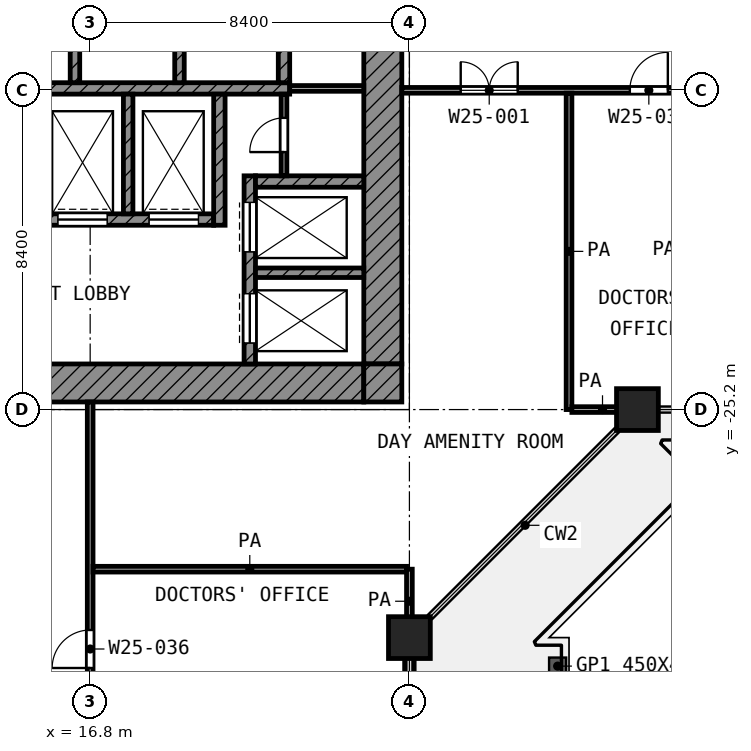
"""IFC4 building model, lengths in metres.
Left out: names, types, materials, properties, quantities, classifications, styles, units other than length and angle.
Written with IfcOpenShell. Run it as: python <this file> out.ifc"""

import sys

from ifc_helpers import new_model, si_unit, direction, frame, frame_2d, origin, origin_2d, place, context, subcontext, project, spatial, rectangle, extrude, element, fill, save


model = new_model("IFC4")
c1 = context("Model", 3, precision=1e-05, world=origin(), true_north=direction((0.0, 1.0)))
c2 = subcontext(c1, "Body", "Model", "MODEL_VIEW")
j1 = project(units=[si_unit("LENGTHUNIT", "METRE"), si_unit("PLANEANGLEUNIT", "RADIAN")], contexts=[c1])
p1 = place(None, origin())
s1 = spatial("IfcSite", under=j1, at=p1, CompositionType="ELEMENT")
p2 = place(p1, origin())
s2 = spatial("IfcBuilding", under=s1, at=p2, CompositionType="ELEMENT")
p3 = place(p2, frame((0.0, 0.0, 111.4)))
s3 = spatial("IfcBuildingStorey", under=s2, at=p3, CompositionType="ELEMENT", Elevation=111.4)
for number, where, z_axis, x_axis in (
    (1, (31.2, -25.2, 0.0), (0.0, 0.0, 1.0), (1.0, 0.0, 0.0)),
    (2, (25.2, -31.2, 0.0), (0.0, 0.0, 1.0), (1.0, 0.0, 0.0)),
):
    element("IfcColumn", number, at=place(p3, frame(where, z_axis=z_axis, x_axis=x_axis)), inside=s3, PredefinedType="COLUMN", context=c2, shape_type="SweptSolid", body=[
        extrude(rectangle(XDim=1.1, YDim=1.1, at=origin_2d()), origin(), (0.0, 0.0, 1.0), 4.2),
    ])
p4 = place(p3, frame((25.2, -34.992, 0.0), z_axis=(0.0, 0.0, 1.0), x_axis=(0.0, 1.0, 0.0)))
e3 = element("IfcWall", 3, at=p4, inside=s3, PredefinedType="SOLIDWALL", context=c2, shape_type="SweptSolid", body=[
    extrude(rectangle(XDim=3.242, YDim=0.25, at=frame_2d((1.621, 0.0))), origin(), (0.0, 0.0, 1.0), 3.48),
])
p5 = place(p4, frame((1.621, 0.0, 0.0)))
e4 = element("IfcOpeningElement", 4, at=p5, cuts=e3, PredefinedType="OPENING", context=c2, shape_type="SweptSolid", body=[
    extrude(rectangle(XDim=1.0, YDim=2.1, at=frame_2d((0.5, 1.05))), frame((0.0, 0.135, 0.0), z_axis=(0.0, -1.0, 0.0), x_axis=(1.0, 0.0, 0.0)), (0.0, 0.0, 1.0), 0.27),
])
p6 = place(p3, frame((24.5, -24.0, 0.0), z_axis=(0.0, 0.0, 1.0), x_axis=(0.0, 1.0, 0.0)))
e5 = element("IfcWall", 5, at=p6, inside=s3, PredefinedType="SHEAR", context=c2, shape_type="SweptSolid", body=[
    extrude(rectangle(XDim=18.6, YDim=1.0, at=frame_2d((9.3, 0.0))), origin(), (0.0, 0.0, 1.0), 3.6),
])
p7 = place(p6, frame((10.5, 0.0, 0.0)))
e6 = element("IfcOpeningElement", 6, at=p7, cuts=e5, PredefinedType="OPENING", context=c2, shape_type="SweptSolid", body=[
    extrude(rectangle(XDim=1.8, YDim=2.1, at=frame_2d((0.9, 1.05))), frame((0.0, 0.51, 0.0), z_axis=(0.0, -1.0, 0.0), x_axis=(1.0, 0.0, 0.0)), (0.0, 0.0, 1.0), 1.02),
])
p8 = place(p3, frame((5.4, -24.5, 0.0), z_axis=(0.0, 0.0, 1.0), x_axis=(1.0, 0.0, 0.0)))
e7 = element("IfcWall", 7, at=p8, inside=s3, PredefinedType="SHEAR", context=c2, shape_type="SweptSolid", body=[
    extrude(rectangle(XDim=18.6, YDim=1.0, at=frame_2d((9.3, 0.0))), origin(), (0.0, 0.0, 1.0), 3.6),
])
p9 = place(p8, frame((6.3, 0.0, 0.0)))
e8 = element("IfcOpeningElement", 8, at=p9, cuts=e7, PredefinedType="OPENING", context=c2, shape_type="SweptSolid", body=[
    extrude(rectangle(XDim=1.8, YDim=2.1, at=frame_2d((0.9, 1.05))), frame((0.0, 0.51, 0.0), z_axis=(0.0, -1.0, 0.0), x_axis=(1.0, 0.0, 0.0)), (0.0, 0.0, 1.0), 1.02),
])
p10 = place(p3, frame((24.5, -25.0, 0.0), z_axis=(0.0, 0.0, 1.0), x_axis=(0.0, 1.0, 0.0)))
e9 = element("IfcWall", 9, at=p10, inside=s3, PredefinedType="SHEAR", context=c2, shape_type="SweptSolid", body=[
    extrude(rectangle(XDim=1.0, YDim=1.0, at=frame_2d((0.5, 0.0))), origin(), (0.0, 0.0, 1.0), 3.6),
])
p11 = place(p3, frame((5.4, -16.75, 0.0), z_axis=(0.0, 0.0, 1.0), x_axis=(1.0, 0.0, 0.0)))
e10 = element("IfcWall", 10, at=p11, inside=s3, PredefinedType="SHEAR", context=c2, shape_type="SweptSolid", body=[
    extrude(rectangle(XDim=16.65, YDim=0.3, at=frame_2d((8.325, 0.0))), origin(), (0.0, 0.0, 1.0), 3.6),
])
p12 = place(p3, frame((5.4, -20.2, 0.0), z_axis=(0.0, 0.0, 1.0), x_axis=(1.0, 0.0, 0.0)))
e11 = element("IfcWall", 11, at=p12, inside=s3, PredefinedType="SHEAR", context=c2, shape_type="SweptSolid", body=[
    extrude(rectangle(XDim=14.65, YDim=0.3, at=frame_2d((7.325, 0.0))), origin(), (0.0, 0.0, 1.0), 3.6),
])
p13 = place(p12, frame((10.55, 0.0, 0.0)))
e12 = element("IfcOpeningElement", 12, at=p13, cuts=e11, PredefinedType="OPENING", context=c2, shape_type="SweptSolid", body=[
    extrude(rectangle(XDim=1.3, YDim=2.1, at=frame_2d((0.65, 1.05))), frame((0.0, 0.16, 0.0), z_axis=(0.0, -1.0, 0.0), x_axis=(1.0, 0.0, 0.0)), (0.0, 0.0, 1.0), 0.32),
])
p14 = place(p12, frame((12.95, 0.0, 0.0)))
e13 = element("IfcOpeningElement", 13, at=p14, cuts=e11, PredefinedType="OPENING", context=c2, shape_type="SweptSolid", body=[
    extrude(rectangle(XDim=1.3, YDim=2.1, at=frame_2d((0.65, 1.05))), frame((0.0, 0.16, 0.0), z_axis=(0.0, -1.0, 0.0), x_axis=(1.0, 0.0, 0.0)), (0.0, 0.0, 1.0), 0.32),
])
p15 = place(p12, frame((0.55, 0.0, 0.0)))
e14 = element("IfcOpeningElement", 14, at=p15, cuts=e11, PredefinedType="OPENING", context=c2, shape_type="SweptSolid", body=[
    extrude(rectangle(XDim=1.3, YDim=2.1, at=frame_2d((0.65, 1.05))), frame((0.0, 0.16, 0.0), z_axis=(0.0, -1.0, 0.0), x_axis=(1.0, 0.0, 0.0)), (0.0, 0.0, 1.0), 0.32),
])
p16 = place(p12, frame((2.95, 0.0, 0.0)))
e15 = element("IfcOpeningElement", 15, at=p16, cuts=e11, PredefinedType="OPENING", context=c2, shape_type="SweptSolid", body=[
    extrude(rectangle(XDim=1.3, YDim=2.1, at=frame_2d((0.65, 1.05))), frame((0.0, 0.16, 0.0), z_axis=(0.0, -1.0, 0.0), x_axis=(1.0, 0.0, 0.0)), (0.0, 0.0, 1.0), 0.32),
])
p17 = place(p12, frame((5.95, 0.0, 0.0)))
e16 = element("IfcOpeningElement", 16, at=p17, cuts=e11, PredefinedType="OPENING", context=c2, shape_type="SweptSolid", body=[
    extrude(rectangle(XDim=0.9, YDim=2.1, at=frame_2d((0.45, 1.05))), frame((0.0, 0.16, 0.0), z_axis=(0.0, -1.0, 0.0), x_axis=(1.0, 0.0, 0.0)), (0.0, 0.0, 1.0), 0.32),
])
p18 = place(p12, frame((8.35, 0.0, 0.0)))
e17 = element("IfcOpeningElement", 17, at=p18, cuts=e11, PredefinedType="OPENING", context=c2, shape_type="SweptSolid", body=[
    extrude(rectangle(XDim=0.9, YDim=2.1, at=frame_2d((0.45, 1.05))), frame((0.0, 0.16, 0.0), z_axis=(0.0, -1.0, 0.0), x_axis=(1.0, 0.0, 0.0)), (0.0, 0.0, 1.0), 0.32),
])
p19 = place(p3, frame((20.2, -20.35, 0.0), z_axis=(0.0, 0.0, 1.0), x_axis=(0.0, 1.0, 0.0)))
e18 = element("IfcWall", 18, at=p19, inside=s3, PredefinedType="SHEAR", context=c2, shape_type="SweptSolid", body=[
    extrude(rectangle(XDim=3.45, YDim=0.3, at=frame_2d((1.725, 0.0))), origin(), (0.0, 0.0, 1.0), 3.6),
])
p20 = place(p3, frame((21.9, -16.6, 0.0), z_axis=(0.0, 0.0, 1.0), x_axis=(0.0, 1.0, 0.0)))
e19 = element("IfcWall", 19, at=p20, inside=s3, PredefinedType="SHEAR", context=c2, shape_type="SweptSolid", body=[
    extrude(rectangle(XDim=2.35, YDim=0.3, at=frame_2d((1.175, 0.0))), origin(), (0.0, 0.0, 1.0), 3.6),
])
p21 = place(p3, frame((21.15, -19.2, 0.0), z_axis=(0.0, 0.0, 1.0), x_axis=(1.0, 0.0, 0.0)))
e20 = element("IfcWall", 20, at=p21, inside=s3, PredefinedType="SHEAR", context=c2, shape_type="SweptSolid", body=[
    extrude(rectangle(XDim=2.85, YDim=0.3, at=frame_2d((1.425, 0.0))), origin(), (0.0, 0.0, 1.0), 3.6),
])
p22 = place(p3, frame((21.0, -24.0, 0.0), z_axis=(0.0, 0.0, 1.0), x_axis=(0.0, 1.0, 0.0)))
e21 = element("IfcWall", 21, at=p22, inside=s3, PredefinedType="SHEAR", context=c2, shape_type="SweptSolid", body=[
    extrude(rectangle(XDim=4.95, YDim=0.3, at=frame_2d((2.475, 0.0))), origin(), (0.0, 0.0, 1.0), 3.6),
])
p23 = place(p22, frame((2.95, 0.0, 0.0)))
e22 = element("IfcOpeningElement", 22, at=p23, cuts=e21, PredefinedType="OPENING", context=c2, shape_type="SweptSolid", body=[
    extrude(rectangle(XDim=1.3, YDim=2.1, at=frame_2d((0.65, 1.05))), frame((0.0, 0.16, 0.0), z_axis=(0.0, -1.0, 0.0), x_axis=(1.0, 0.0, 0.0)), (0.0, 0.0, 1.0), 0.32),
])
p24 = place(p22, frame((0.55, 0.0, 0.0)))
e23 = element("IfcOpeningElement", 23, at=p24, cuts=e21, PredefinedType="OPENING", context=c2, shape_type="SweptSolid", body=[
    extrude(rectangle(XDim=1.3, YDim=2.1, at=frame_2d((0.65, 1.05))), frame((0.0, 0.16, 0.0), z_axis=(0.0, -1.0, 0.0), x_axis=(1.0, 0.0, 0.0)), (0.0, 0.0, 1.0), 0.32),
])
p25 = place(p3, frame((21.15, -21.6, 0.0), z_axis=(0.0, 0.0, 1.0), x_axis=(1.0, 0.0, 0.0)))
e24 = element("IfcWall", 24, at=p25, inside=s3, PredefinedType="SHEAR", context=c2, shape_type="SweptSolid", body=[
    extrude(rectangle(XDim=2.85, YDim=0.25, at=frame_2d((1.425, 0.0))), origin(), (0.0, 0.0, 1.0), 3.6),
])
p26 = place(p3, frame((17.8, -20.05, 0.0), z_axis=(0.0, 0.0, 1.0), x_axis=(0.0, 1.0, 0.0)))
e25 = element("IfcWall", 25, at=p26, inside=s3, PredefinedType="SHEAR", context=c2, shape_type="SweptSolid", body=[
    extrude(rectangle(XDim=3.15, YDim=0.25, at=frame_2d((1.575, 0.0))), origin(), (0.0, 0.0, 1.0), 3.6),
])
for number, where, z_axis, x_axis in (
    (26, (16.4, -16.6, 0.0), (0.0, 0.0, 1.0), (0.0, 1.0, 0.0)),
    (27, (19.15, -16.6, 0.0), (0.0, 0.0, 1.0), (0.0, 1.0, 0.0)),
):
    element("IfcWall", number, at=place(p3, frame(where, z_axis=z_axis, x_axis=x_axis)), inside=s3, PredefinedType="SHEAR", context=c2, shape_type="SweptSolid", body=[
        extrude(rectangle(XDim=2.35, YDim=0.25, at=frame_2d((1.175, 0.0))), origin(), (0.0, 0.0, 1.0), 3.6),
    ])
p27 = place(p3, frame((21.9, -19.05, 0.0), z_axis=(0.0, 0.0, 1.0), x_axis=(0.0, 1.0, 0.0)))
e28 = element("IfcWall", 28, at=p27, inside=s3, PredefinedType="PARTITIONING", context=c2, shape_type="SweptSolid", body=[
    extrude(rectangle(XDim=2.15, YDim=0.15, at=frame_2d((1.075, 0.0))), origin(), (0.0, 0.0, 1.0), 3.6),
])
p28 = place(p27, frame((0.625, 0.0, 0.0)))
e29 = element("IfcOpeningElement", 29, at=p28, cuts=e28, PredefinedType="OPENING", context=c2, shape_type="SweptSolid", body=[
    extrude(rectangle(XDim=0.9, YDim=2.1, at=frame_2d((0.45, 1.05))), frame((0.0, 0.085, 0.0), z_axis=(0.0, -1.0, 0.0), x_axis=(1.0, 0.0, 0.0)), (0.0, 0.0, 1.0), 0.17),
])
p29 = place(p3, frame((22.05, -16.75, 0.0), z_axis=(0.0, 0.0, 1.0), x_axis=(1.0, 0.0, 0.0)))
e30 = element("IfcWall", 30, at=p29, inside=s3, PredefinedType="PARTITIONING", context=c2, shape_type="SweptSolid", body=[
    extrude(rectangle(XDim=1.95, YDim=0.15, at=frame_2d((0.975, 0.0))), origin(), (0.0, 0.0, 1.0), 3.6),
])
p30 = place(p3, frame((16.875, -29.4, 0.0), z_axis=(0.0, 0.0, 1.0), x_axis=(1.0, 0.0, 0.0)))
e31 = element("IfcWall", 31, at=p30, inside=s3, PredefinedType="PARTITIONING", context=c2, shape_type="SweptSolid", body=[
    extrude(rectangle(XDim=8.25, YDim=0.15, at=frame_2d((4.125, 0.0))), origin(), (0.0, 0.0, 1.0), 3.6),
])
p31 = place(p3, frame((29.475, -25.2, 0.0), z_axis=(0.0, 0.0, 1.0), x_axis=(1.0, 0.0, 0.0)))
e32 = element("IfcWall", 32, at=p31, inside=s3, PredefinedType="PARTITIONING", context=c2, shape_type="SweptSolid", body=[
    extrude(rectangle(XDim=1.612, YDim=0.15, at=frame_2d((0.806, 0.0))), origin(), (0.0, 0.0, 1.0), 3.6),
])
p32 = place(p3, frame((25.0, -16.8, 0.0), z_axis=(0.0, 0.0, 1.0), x_axis=(1.0, 0.0, 0.0)))
e33 = element("IfcWall", 33, at=p32, inside=s3, PredefinedType="PARTITIONING", context=c2, shape_type="SweptSolid", body=[
    extrude(rectangle(XDim=50.52, YDim=0.15, at=frame_2d((25.26, 0.0))), origin(), (0.0, 0.0, 1.0), 3.6),
])
p33 = place(p32, frame((1.55, 0.0, 0.0)))
e34 = element("IfcOpeningElement", 34, at=p33, cuts=e33, PredefinedType="OPENING", context=c2, shape_type="SweptSolid", body=[
    extrude(rectangle(XDim=1.5, YDim=2.1, at=frame_2d((0.75, 1.05))), frame((0.0, 0.085, 0.0), z_axis=(0.0, -1.0, 0.0), x_axis=(1.0, 0.0, 0.0)), (0.0, 0.0, 1.0), 0.17),
])
p34 = place(p32, frame((6.0, 0.0, 0.0)))
e35 = element("IfcOpeningElement", 35, at=p34, cuts=e33, PredefinedType="OPENING", context=c2, shape_type="SweptSolid", body=[
    extrude(rectangle(XDim=1.0, YDim=2.1, at=frame_2d((0.5, 1.05))), frame((0.0, 0.085, 0.0), z_axis=(0.0, -1.0, 0.0), x_axis=(1.0, 0.0, 0.0)), (0.0, 0.0, 1.0), 0.17),
])
p35 = place(p32, frame((9.6, 0.0, 0.0)))
e36 = element("IfcOpeningElement", 36, at=p35, cuts=e33, PredefinedType="OPENING", context=c2, shape_type="SweptSolid", body=[
    extrude(rectangle(XDim=1.2, YDim=2.1, at=frame_2d((0.6, 1.05))), frame((0.0, 0.085, 0.0), z_axis=(0.0, -1.0, 0.0), x_axis=(1.0, 0.0, 0.0)), (0.0, 0.0, 1.0), 0.17),
])
p36 = place(p32, frame((18.2, 0.0, 0.0)))
e37 = element("IfcOpeningElement", 37, at=p36, cuts=e33, PredefinedType="OPENING", context=c2, shape_type="SweptSolid", body=[
    extrude(rectangle(XDim=1.2, YDim=2.1, at=frame_2d((0.6, 1.05))), frame((0.0, 0.085, 0.0), z_axis=(0.0, -1.0, 0.0), x_axis=(1.0, 0.0, 0.0)), (0.0, 0.0, 1.0), 0.17),
])
p37 = place(p32, frame((15.45, 0.0, 0.0)))
e38 = element("IfcOpeningElement", 38, at=p37, cuts=e33, PredefinedType="OPENING", context=c2, shape_type="SweptSolid", body=[
    extrude(rectangle(XDim=0.9, YDim=2.1, at=frame_2d((0.45, 1.05))), frame((0.0, 0.085, 0.0), z_axis=(0.0, -1.0, 0.0), x_axis=(1.0, 0.0, 0.0)), (0.0, 0.0, 1.0), 0.17),
])
p38 = place(p32, frame((23.6, 0.0, 0.0)))
e39 = element("IfcOpeningElement", 39, at=p38, cuts=e33, PredefinedType="OPENING", context=c2, shape_type="SweptSolid", body=[
    extrude(rectangle(XDim=1.2, YDim=2.1, at=frame_2d((0.6, 1.05))), frame((0.0, 0.085, 0.0), z_axis=(0.0, -1.0, 0.0), x_axis=(1.0, 0.0, 0.0)), (0.0, 0.0, 1.0), 0.17),
])
p39 = place(p32, frame((26.1, 0.0, 0.0)))
e40 = element("IfcOpeningElement", 40, at=p39, cuts=e33, PredefinedType="OPENING", context=c2, shape_type="SweptSolid", body=[
    extrude(rectangle(XDim=1.2, YDim=2.1, at=frame_2d((0.6, 1.05))), frame((0.0, 0.085, 0.0), z_axis=(0.0, -1.0, 0.0), x_axis=(1.0, 0.0, 0.0)), (0.0, 0.0, 1.0), 0.17),
])
p40 = place(p32, frame((32.0, 0.0, 0.0)))
e41 = element("IfcOpeningElement", 41, at=p40, cuts=e33, PredefinedType="OPENING", context=c2, shape_type="SweptSolid", body=[
    extrude(rectangle(XDim=1.2, YDim=2.1, at=frame_2d((0.6, 1.05))), frame((0.0, 0.085, 0.0), z_axis=(0.0, -1.0, 0.0), x_axis=(1.0, 0.0, 0.0)), (0.0, 0.0, 1.0), 0.17),
])
p41 = place(p32, frame((35.0, 0.0, 0.0)))
e42 = element("IfcOpeningElement", 42, at=p41, cuts=e33, PredefinedType="OPENING", context=c2, shape_type="SweptSolid", body=[
    extrude(rectangle(XDim=1.2, YDim=2.1, at=frame_2d((0.6, 1.05))), frame((0.0, 0.085, 0.0), z_axis=(0.0, -1.0, 0.0), x_axis=(1.0, 0.0, 0.0)), (0.0, 0.0, 1.0), 0.17),
])
p42 = place(p32, frame((40.4, 0.0, 0.0)))
e43 = element("IfcOpeningElement", 43, at=p42, cuts=e33, PredefinedType="OPENING", context=c2, shape_type="SweptSolid", body=[
    extrude(rectangle(XDim=1.2, YDim=2.1, at=frame_2d((0.6, 1.05))), frame((0.0, 0.085, 0.0), z_axis=(0.0, -1.0, 0.0), x_axis=(1.0, 0.0, 0.0)), (0.0, 0.0, 1.0), 0.17),
])
p43 = place(p32, frame((38.8, 0.0, 0.0)))
e44 = element("IfcOpeningElement", 44, at=p43, cuts=e33, PredefinedType="OPENING", context=c2, shape_type="SweptSolid", body=[
    extrude(rectangle(XDim=1.2, YDim=2.1, at=frame_2d((0.6, 1.05))), frame((0.0, 0.085, 0.0), z_axis=(0.0, -1.0, 0.0), x_axis=(1.0, 0.0, 0.0)), (0.0, 0.0, 1.0), 0.17),
])
p44 = place(p32, frame((47.85, 0.0, 0.0)))
e45 = element("IfcOpeningElement", 45, at=p44, cuts=e33, PredefinedType="OPENING", context=c2, shape_type="SweptSolid", body=[
    extrude(rectangle(XDim=1.0, YDim=2.1, at=frame_2d((0.5, 1.05))), frame((0.0, 0.085, 0.0), z_axis=(0.0, -1.0, 0.0), x_axis=(1.0, 0.0, 0.0)), (0.0, 0.0, 1.0), 0.17),
])
p45 = place(p3, frame((16.8, -58.72, 0.0), z_axis=(0.0, 0.0, 1.0), x_axis=(0.0, 1.0, 0.0)))
e46 = element("IfcWall", 46, at=p45, inside=s3, PredefinedType="PARTITIONING", context=c2, shape_type="SweptSolid", body=[
    extrude(rectangle(XDim=33.72, YDim=0.15, at=frame_2d((16.86, 0.0))), origin(), (0.0, 0.0, 1.0), 2.7),
])
p46 = place(p45, frame((26.72, 0.0, 0.0)))
e47 = element("IfcOpeningElement", 47, at=p46, cuts=e46, PredefinedType="OPENING", context=c2, shape_type="SweptSolid", body=[
    extrude(rectangle(XDim=1.0, YDim=2.1, at=frame_2d((0.5, 1.05))), frame((0.0, 0.085, 0.0), z_axis=(0.0, -1.0, 0.0), x_axis=(1.0, 0.0, 0.0)), (0.0, 0.0, 1.0), 0.17),
])
p47 = place(p45, frame((23.32, 0.0, 0.0)))
e48 = element("IfcOpeningElement", 48, at=p47, cuts=e46, PredefinedType="OPENING", context=c2, shape_type="SweptSolid", body=[
    extrude(rectangle(XDim=1.2, YDim=2.1, at=frame_2d((0.6, 1.05))), frame((0.0, 0.085, 0.0), z_axis=(0.0, -1.0, 0.0), x_axis=(1.0, 0.0, 0.0)), (0.0, 0.0, 1.0), 0.17),
])
p48 = place(p45, frame((14.92, 0.0, 0.0)))
e49 = element("IfcOpeningElement", 49, at=p48, cuts=e46, PredefinedType="OPENING", context=c2, shape_type="SweptSolid", body=[
    extrude(rectangle(XDim=1.2, YDim=2.1, at=frame_2d((0.6, 1.05))), frame((0.0, 0.085, 0.0), z_axis=(0.0, -1.0, 0.0), x_axis=(1.0, 0.0, 0.0)), (0.0, 0.0, 1.0), 0.17),
])
p49 = place(p45, frame((13.32, 0.0, 0.0)))
e50 = element("IfcOpeningElement", 50, at=p49, cuts=e46, PredefinedType="OPENING", context=c2, shape_type="SweptSolid", body=[
    extrude(rectangle(XDim=1.2, YDim=2.1, at=frame_2d((0.6, 1.05))), frame((0.0, 0.085, 0.0), z_axis=(0.0, -1.0, 0.0), x_axis=(1.0, 0.0, 0.0)), (0.0, 0.0, 1.0), 0.17),
])
p50 = place(p45, frame((9.52, 0.0, 0.0)))
e51 = element("IfcOpeningElement", 51, at=p50, cuts=e46, PredefinedType="OPENING", context=c2, shape_type="SweptSolid", body=[
    extrude(rectangle(XDim=1.2, YDim=2.1, at=frame_2d((0.6, 1.05))), frame((0.0, 0.085, 0.0), z_axis=(0.0, -1.0, 0.0), x_axis=(1.0, 0.0, 0.0)), (0.0, 0.0, 1.0), 0.17),
])
p51 = place(p45, frame((3.37, 0.0, 0.0)))
e52 = element("IfcOpeningElement", 52, at=p51, cuts=e46, PredefinedType="OPENING", context=c2, shape_type="SweptSolid", body=[
    extrude(rectangle(XDim=1.5, YDim=2.1, at=frame_2d((0.75, 1.05))), frame((0.0, 0.085, 0.0), z_axis=(0.0, -1.0, 0.0), x_axis=(1.0, 0.0, 0.0)), (0.0, 0.0, 1.0), 0.17),
])
p52 = place(p3, frame((25.2, -31.087, 0.0), z_axis=(0.0, 0.0, 1.0), x_axis=(0.0, 1.0, 0.0)))
e53 = element("IfcWall", 53, at=p52, inside=s3, PredefinedType="PARTITIONING", context=c2, shape_type="SweptSolid", body=[
    extrude(rectangle(XDim=1.687, YDim=0.15, at=frame_2d((0.844, 0.0))), origin(), (0.0, 0.0, 1.0), 3.6),
])
p53 = place(p3, frame((29.4, -25.2, 0.0), z_axis=(0.0, 0.0, 1.0), x_axis=(0.0, 1.0, 0.0)))
e54 = element("IfcWall", 54, at=p53, inside=s3, PredefinedType="PARTITIONING", context=c2, shape_type="SweptSolid", body=[
    extrude(rectangle(XDim=8.325, YDim=0.15, at=frame_2d((4.163, 0.0))), origin(), (0.0, 0.0, 1.0), 3.6),
])
p54 = place(p23, origin())
e55 = element("IfcDoor", 55, at=p54, inside=s3, OperationType="DOUBLE_DOOR_SLIDING", PredefinedType="DOOR", context=c2, shape_type="SweptSolid", body=[
    extrude(rectangle(XDim=1.3, YDim=2.1, at=frame_2d((0.65, 1.05))), frame((0.0, 0.025, 0.0), z_axis=(0.0, -1.0, 0.0), x_axis=(1.0, 0.0, 0.0)), (0.0, 0.0, 1.0), 0.05),
])
fill(e22, e55)
p55 = place(p24, origin())
e56 = element("IfcDoor", 56, at=p55, inside=s3, OperationType="DOUBLE_DOOR_SLIDING", PredefinedType="DOOR", context=c2, shape_type="SweptSolid", body=[
    extrude(rectangle(XDim=1.3, YDim=2.1, at=frame_2d((0.65, 1.05))), frame((0.0, 0.025, 0.0), z_axis=(0.0, -1.0, 0.0), x_axis=(1.0, 0.0, 0.0)), (0.0, 0.0, 1.0), 0.05),
])
fill(e23, e56)
p56 = place(p13, origin())
e57 = element("IfcDoor", 57, at=p56, inside=s3, OperationType="DOUBLE_DOOR_SLIDING", PredefinedType="DOOR", context=c2, shape_type="SweptSolid", body=[
    extrude(rectangle(XDim=1.3, YDim=2.1, at=frame_2d((0.65, 1.05))), frame((0.0, 0.025, 0.0), z_axis=(0.0, -1.0, 0.0), x_axis=(1.0, 0.0, 0.0)), (0.0, 0.0, 1.0), 0.05),
])
fill(e12, e57)
p57 = place(p14, origin())
e58 = element("IfcDoor", 58, at=p57, inside=s3, OperationType="DOUBLE_DOOR_SLIDING", PredefinedType="DOOR", context=c2, shape_type="SweptSolid", body=[
    extrude(rectangle(XDim=1.3, YDim=2.1, at=frame_2d((0.65, 1.05))), frame((0.0, 0.025, 0.0), z_axis=(0.0, -1.0, 0.0), x_axis=(1.0, 0.0, 0.0)), (0.0, 0.0, 1.0), 0.05),
])
fill(e13, e58)
p58 = place(p28, origin())
e59 = element("IfcDoor", 59, at=p58, inside=s3, OperationType="SINGLE_SWING_LEFT", PredefinedType="DOOR", context=c2, shape_type="SweptSolid", body=[
    extrude(rectangle(XDim=0.9, YDim=2.1, at=frame_2d((0.45, 1.05))), frame((0.0, 0.025, 0.0), z_axis=(0.0, -1.0, 0.0), x_axis=(1.0, 0.0, 0.0)), (0.0, 0.0, 1.0), 0.05),
])
fill(e29, e59)
p59 = place(p33, origin())
e60 = element("IfcDoor", 60, at=p59, inside=s3, OperationType="DOUBLE_DOOR_SINGLE_SWING", PredefinedType="DOOR", context=c2, shape_type="SweptSolid", body=[
    extrude(rectangle(XDim=1.5, YDim=2.1, at=frame_2d((0.75, 1.05))), frame((0.0, 0.025, 0.0), z_axis=(0.0, -1.0, 0.0), x_axis=(1.0, 0.0, 0.0)), (0.0, 0.0, 1.0), 0.05),
])
fill(e34, e60)
p60 = place(p34, origin())
e61 = element("IfcDoor", 61, at=p60, inside=s3, OperationType="SINGLE_SWING_RIGHT", PredefinedType="DOOR", context=c2, shape_type="SweptSolid", body=[
    extrude(rectangle(XDim=1.0, YDim=2.1, at=frame_2d((0.5, 1.05))), frame((0.0, 0.025, 0.0), z_axis=(0.0, -1.0, 0.0), x_axis=(1.0, 0.0, 0.0)), (0.0, 0.0, 1.0), 0.05),
])
fill(e35, e61)
p61 = place(p46, origin())
e62 = element("IfcDoor", 62, at=p61, inside=s3, OperationType="SINGLE_SWING_LEFT", PredefinedType="DOOR", context=c2, shape_type="SweptSolid", body=[
    extrude(rectangle(XDim=1.0, YDim=2.1, at=frame_2d((0.5, 1.05))), frame((0.0, 0.025, 0.0), z_axis=(0.0, -1.0, 0.0), x_axis=(1.0, 0.0, 0.0)), (0.0, 0.0, 1.0), 0.05),
])
fill(e47, e62)
save(model, sys.argv[1])
